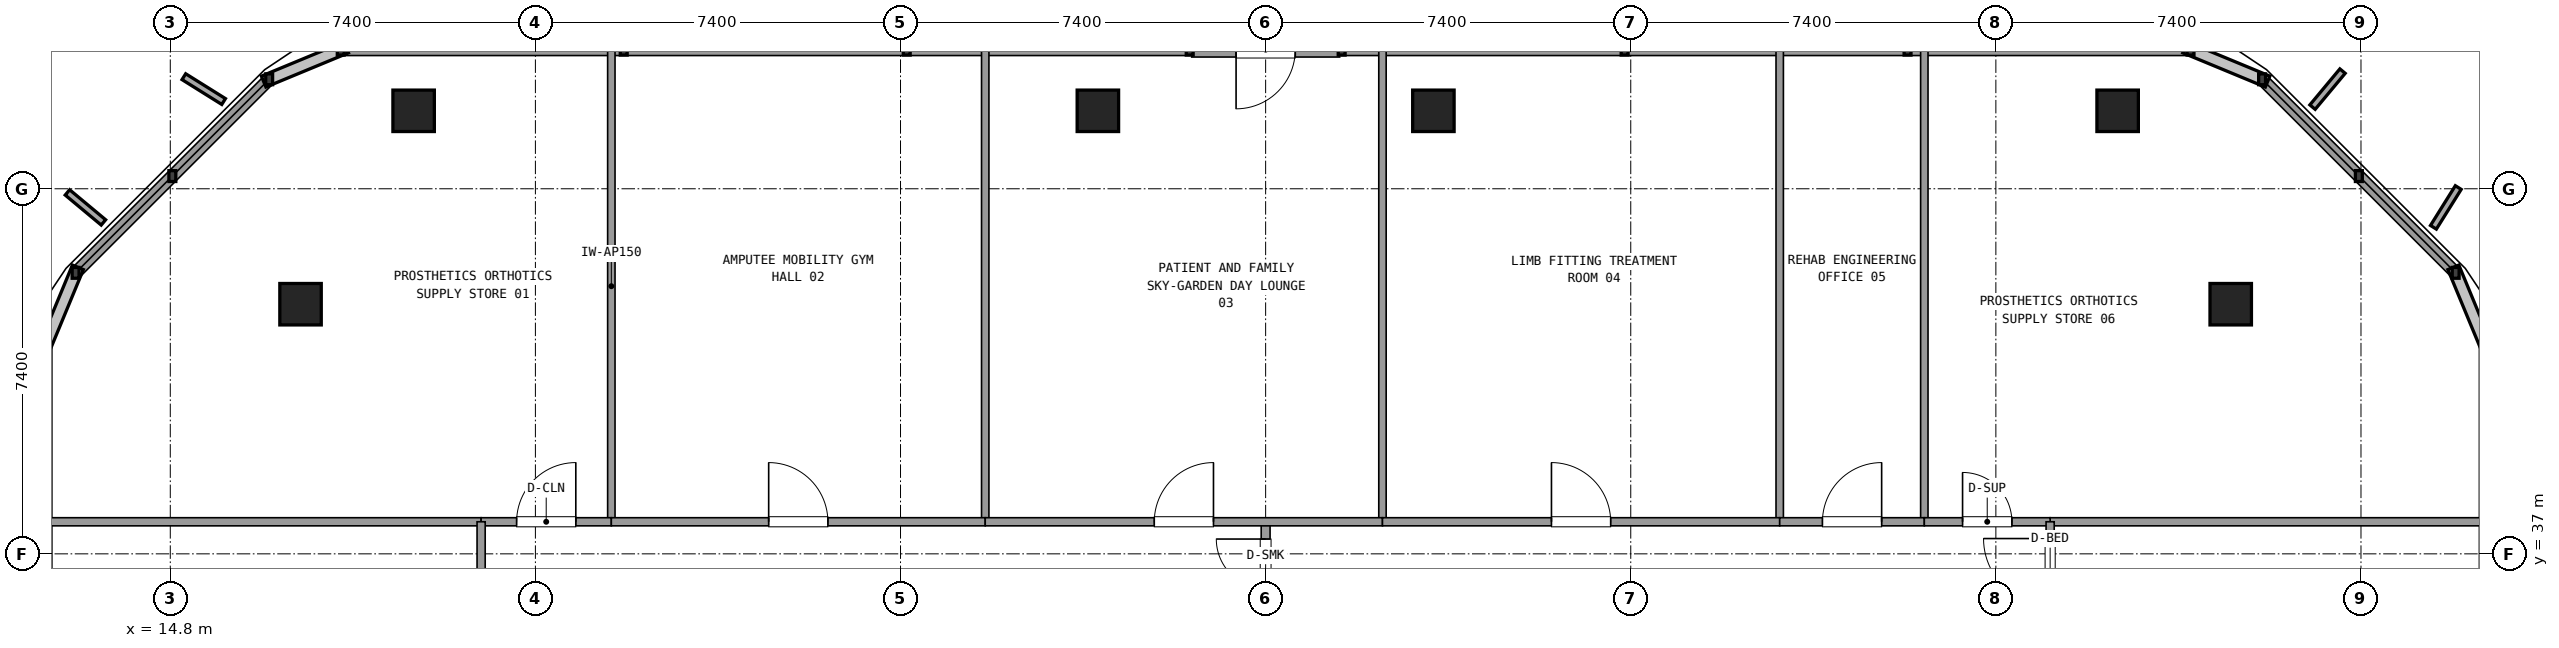
"""IFC4 building model, lengths in metres.
Left out: names, types, materials, properties, quantities, classifications, styles, units other than length and angle.
Written with IfcOpenShell. Run it as: python <this file> out.ifc"""

import sys

from ifc_helpers import new_model, si_unit, direction, frame, frame_2d, origin, origin_2d, place, context, subcontext, project, spatial, rectangle, extrude, element, fill, save


model = new_model("IFC4")
c1 = context("Model", 3, precision=1e-05, world=origin(), true_north=direction((0.0, 1.0)))
c2 = subcontext(c1, "Body", "Model", "MODEL_VIEW")
j1 = project(units=[si_unit("LENGTHUNIT", "METRE"), si_unit("PLANEANGLEUNIT", "RADIAN")], contexts=[c1])
p1 = place(None, origin())
s1 = spatial("IfcSite", under=j1, at=p1, CompositionType="ELEMENT")
p2 = place(p1, origin())
s2 = spatial("IfcBuilding", under=s1, at=p2, CompositionType="ELEMENT")
p3 = place(p2, frame((0.0, 0.0, 282.42)))
s3 = spatial("IfcBuildingStorey", under=s2, at=p3, CompositionType="ELEMENT", Elevation=282.42)
for number, where, z_axis, x_axis in (
    (1, (56.56, 42.06, 0.0), (0.0, 0.0, 1.0), (1.0, 0.0, 0.0)),
    (2, (54.268, 45.98, 0.0), (0.0, 0.0, 1.0), (1.0, 0.0, 0.0)),
    (3, (40.4, 45.98, 0.0), (0.0, 0.0, 1.0), (1.0, 0.0, 0.0)),
    (4, (33.6, 45.98, 0.0), (0.0, 0.0, 1.0), (1.0, 0.0, 0.0)),
    (5, (19.732, 45.98, 0.0), (0.0, 0.0, 1.0), (1.0, 0.0, 0.0)),
    (6, (17.44, 42.06, 0.0), (0.0, 0.0, 1.0), (1.0, 0.0, 0.0)),
):
    element("IfcColumn", number, at=place(p3, frame(where, z_axis=z_axis, x_axis=x_axis)), inside=s3, PredefinedType="COLUMN", context=c2, shape_type="SweptSolid", body=[
        extrude(rectangle(XDim=0.84, YDim=0.84, at=origin_2d()), origin(), (0.0, 0.0, 1.0), 3.6),
    ])
p4 = place(p3, frame((61.72, 10.555, 0.0), z_axis=(0.0, 0.0, 1.0), x_axis=(0.0, 1.0, 0.0)))
e7 = element("IfcWall", 7, at=p4, inside=s3, PredefinedType="SOLIDWALL", context=c2, shape_type="SweptSolid", body=[
    extrude(rectangle(XDim=30.69, YDim=0.24, at=frame_2d((15.345, 0.0))), origin(), (0.0, 0.0, 1.0), 0.85),
])
p5 = place(p3, frame((61.119, 42.696, 0.0), z_axis=(0.0, 0.0, 1.0), x_axis=(-0.707106781187, 0.707106781187, 0.0)))
e8 = element("IfcWall", 8, at=p5, inside=s3, PredefinedType="SOLIDWALL", context=c2, shape_type="SweptSolid", body=[
    extrude(rectangle(XDim=5.548, YDim=0.24, at=frame_2d((2.774, 0.0))), origin(), (0.0, 0.0, 1.0), 0.85),
])
p6 = place(p3, frame((38.501, 47.22, 0.0), z_axis=(0.0, 0.0, 1.0), x_axis=(-1.0, 0.0, 0.0)))
e9 = element("IfcWall", 9, at=p6, inside=s3, PredefinedType="SOLIDWALL", context=c2, shape_type="SweptSolid", body=[
    extrude(rectangle(XDim=3.0, YDim=0.3, at=frame_2d((1.5, 0.0))), origin(), (0.0, 0.0, 1.0), 2.35),
])
p7 = place(p6, frame((0.9, 0.0, 0.0)))
e10 = element("IfcOpeningElement", 10, at=p7, cuts=e9, PredefinedType="OPENING", context=c2, shape_type="SweptSolid", body=[
    extrude(rectangle(XDim=1.2, YDim=2.2, at=frame_2d((0.6, 1.1))), frame((0.0, 0.16, 0.0), z_axis=(0.0, -1.0, 0.0), x_axis=(1.0, 0.0, 0.0)), (0.0, 0.0, 1.0), 0.32),
])
p8 = place(p3, frame((55.745, 47.22, 0.0), z_axis=(0.0, 0.0, 1.0), x_axis=(-1.0, 0.0, 0.0)))
e11 = element("IfcWall", 11, at=p8, inside=s3, PredefinedType="SOLIDWALL", context=c2, shape_type="SweptSolid", body=[
    extrude(rectangle(XDim=17.204, YDim=0.24, at=frame_2d((8.602, 0.0))), origin(), (0.0, 0.0, 1.0), 0.85),
])
p9 = place(p3, frame((35.461, 47.22, 0.0), z_axis=(0.0, 0.0, 1.0), x_axis=(-1.0, 0.0, 0.0)))
e12 = element("IfcWall", 12, at=p9, inside=s3, PredefinedType="SOLIDWALL", context=c2, shape_type="SweptSolid", body=[
    extrude(rectangle(XDim=17.206, YDim=0.24, at=frame_2d((8.603, 0.0))), origin(), (0.0, 0.0, 1.0), 0.85),
])
p10 = place(p3, frame((16.804, 46.619, 0.0), z_axis=(0.0, 0.0, 1.0), x_axis=(-0.707106781187, -0.707106781187, 0.0)))
e13 = element("IfcWall", 13, at=p10, inside=s3, PredefinedType="SOLIDWALL", context=c2, shape_type="SweptSolid", body=[
    extrude(rectangle(XDim=5.548, YDim=0.24, at=frame_2d((2.774, 0.0))), origin(), (0.0, 0.0, 1.0), 0.85),
])
p11 = place(p3, frame((12.28, 41.245, 0.0), z_axis=(0.0, 0.0, 1.0), x_axis=(0.0, -1.0, 0.0)))
e14 = element("IfcWall", 14, at=p11, inside=s3, PredefinedType="SOLIDWALL", context=c2, shape_type="SweptSolid", body=[
    extrude(rectangle(XDim=30.69, YDim=0.24, at=frame_2d((15.345, 0.0))), origin(), (0.0, 0.0, 1.0), 0.85),
])
p12 = place(p3, frame((37.0, 34.95, 0.0), z_axis=(0.0, 0.0, 1.0), x_axis=(0.0, 1.0, 0.0)))
e15 = element("IfcWall", 15, at=p12, inside=s3, PredefinedType="PARTITIONING", context=c2, shape_type="SweptSolid", body=[
    extrude(rectangle(XDim=2.7, YDim=0.18, at=frame_2d((1.35, 0.0))), origin(), (0.0, 0.0, 1.0), 2.24),
])
p13 = place(p12, frame((0.35, 0.0, 0.0)))
e16 = element("IfcOpeningElement", 16, at=p13, cuts=e15, PredefinedType="OPENING", context=c2, shape_type="SweptSolid", body=[
    extrude(rectangle(XDim=2.0, YDim=2.2, at=frame_2d((1.0, 1.1))), frame((0.0, 0.1, 0.0), z_axis=(0.0, -1.0, 0.0), x_axis=(1.0, 0.0, 0.0)), (0.0, 0.0, 1.0), 0.2),
])
for number, where, z_axis, x_axis in (
    (17, (12.3, 37.65, 0.0), (0.0, 0.0, 1.0), (1.0, 0.0, 0.0)),
    (18, (52.9, 37.65, 0.0), (0.0, 0.0, 1.0), (1.0, 0.0, 0.0)),
):
    element("IfcWall", number, at=place(p3, frame(where, z_axis=z_axis, x_axis=x_axis)), inside=s3, PredefinedType="PARTITIONING", context=c2, shape_type="SweptSolid", body=[
        extrude(rectangle(XDim=8.8, YDim=0.165, at=frame_2d((4.4, 0.0))), origin(), (0.0, 0.0, 1.0), 2.24),
    ])
p14 = place(p3, frame((23.739, 37.65, 0.0), z_axis=(0.0, 0.0, 1.0), x_axis=(0.0, 1.0, 0.0)))
e19 = element("IfcWall", 19, at=p14, inside=s3, PredefinedType="PARTITIONING", context=c2, shape_type="SweptSolid", body=[
    extrude(rectangle(XDim=9.55, YDim=0.15, at=frame_2d((4.775, 0.0))), origin(), (0.0, 0.0, 1.0), 2.24),
])
p15 = place(p3, frame((21.1, 37.65, 0.0), z_axis=(0.0, 0.0, 1.0), x_axis=(1.0, 0.0, 0.0)))
e20 = element("IfcWall", 20, at=p15, inside=s3, PredefinedType="PARTITIONING", context=c2, shape_type="SweptSolid", body=[
    extrude(rectangle(XDim=2.639, YDim=0.165, at=frame_2d((1.319, 0.0))), origin(), (0.0, 0.0, 1.0), 2.24),
])
p16 = place(p15, frame((0.719, 0.0, 0.0)))
e21 = element("IfcOpeningElement", 21, at=p16, cuts=e20, PredefinedType="OPENING", context=c2, shape_type="SweptSolid", body=[
    extrude(rectangle(XDim=1.2, YDim=2.15, at=frame_2d((0.6, 1.075))), frame((0.0, 0.093, 0.0), z_axis=(0.0, -1.0, 0.0), x_axis=(1.0, 0.0, 0.0)), (0.0, 0.0, 1.0), 0.185),
])
p17 = place(p3, frame((31.317, 37.65, 0.0), z_axis=(0.0, 0.0, 1.0), x_axis=(0.0, 1.0, 0.0)))
e22 = element("IfcWall", 22, at=p17, inside=s3, PredefinedType="PARTITIONING", context=c2, shape_type="SweptSolid", body=[
    extrude(rectangle(XDim=9.55, YDim=0.15, at=frame_2d((4.775, 0.0))), origin(), (0.0, 0.0, 1.0), 2.24),
])
p18 = place(p3, frame((23.739, 37.65, 0.0), z_axis=(0.0, 0.0, 1.0), x_axis=(1.0, 0.0, 0.0)))
e23 = element("IfcWall", 23, at=p18, inside=s3, PredefinedType="PARTITIONING", context=c2, shape_type="SweptSolid", body=[
    extrude(rectangle(XDim=7.578, YDim=0.165, at=frame_2d((3.789, 0.0))), origin(), (0.0, 0.0, 1.0), 2.24),
])
p19 = place(p18, frame((3.189, 0.0, 0.0)))
e24 = element("IfcOpeningElement", 24, at=p19, cuts=e23, PredefinedType="OPENING", context=c2, shape_type="SweptSolid", body=[
    extrude(rectangle(XDim=1.2, YDim=2.15, at=frame_2d((0.6, 1.075))), frame((0.0, 0.093, 0.0), z_axis=(0.0, -1.0, 0.0), x_axis=(1.0, 0.0, 0.0)), (0.0, 0.0, 1.0), 0.185),
])
p20 = place(p3, frame((39.368, 37.65, 0.0), z_axis=(0.0, 0.0, 1.0), x_axis=(0.0, 1.0, 0.0)))
e25 = element("IfcWall", 25, at=p20, inside=s3, PredefinedType="PARTITIONING", context=c2, shape_type="SweptSolid", body=[
    extrude(rectangle(XDim=9.55, YDim=0.15, at=frame_2d((4.775, 0.0))), origin(), (0.0, 0.0, 1.0), 2.24),
])
p21 = place(p3, frame((31.317, 37.65, 0.0), z_axis=(0.0, 0.0, 1.0), x_axis=(1.0, 0.0, 0.0)))
e26 = element("IfcWall", 26, at=p21, inside=s3, PredefinedType="PARTITIONING", context=c2, shape_type="SweptSolid", body=[
    extrude(rectangle(XDim=8.051, YDim=0.165, at=frame_2d((4.025, 0.0))), origin(), (0.0, 0.0, 1.0), 2.24),
])
p22 = place(p21, frame((3.426, 0.0, 0.0)))
e27 = element("IfcOpeningElement", 27, at=p22, cuts=e26, PredefinedType="OPENING", context=c2, shape_type="SweptSolid", body=[
    extrude(rectangle(XDim=1.2, YDim=2.15, at=frame_2d((0.6, 1.075))), frame((0.0, 0.093, 0.0), z_axis=(0.0, -1.0, 0.0), x_axis=(1.0, 0.0, 0.0)), (0.0, 0.0, 1.0), 0.185),
])
p23 = place(p3, frame((47.419, 37.65, 0.0), z_axis=(0.0, 0.0, 1.0), x_axis=(0.0, 1.0, 0.0)))
e28 = element("IfcWall", 28, at=p23, inside=s3, PredefinedType="PARTITIONING", context=c2, shape_type="SweptSolid", body=[
    extrude(rectangle(XDim=9.55, YDim=0.15, at=frame_2d((4.775, 0.0))), origin(), (0.0, 0.0, 1.0), 2.24),
])
p24 = place(p3, frame((39.368, 37.65, 0.0), z_axis=(0.0, 0.0, 1.0), x_axis=(1.0, 0.0, 0.0)))
e29 = element("IfcWall", 29, at=p24, inside=s3, PredefinedType="PARTITIONING", context=c2, shape_type="SweptSolid", body=[
    extrude(rectangle(XDim=8.051, YDim=0.165, at=frame_2d((4.025, 0.0))), origin(), (0.0, 0.0, 1.0), 2.24),
])
p25 = place(p24, frame((3.425, 0.0, 0.0)))
e30 = element("IfcOpeningElement", 30, at=p25, cuts=e29, PredefinedType="OPENING", context=c2, shape_type="SweptSolid", body=[
    extrude(rectangle(XDim=1.2, YDim=2.15, at=frame_2d((0.6, 1.075))), frame((0.0, 0.093, 0.0), z_axis=(0.0, -1.0, 0.0), x_axis=(1.0, 0.0, 0.0)), (0.0, 0.0, 1.0), 0.185),
])
p26 = place(p3, frame((50.35, 37.65, 0.0), z_axis=(0.0, 0.0, 1.0), x_axis=(0.0, 1.0, 0.0)))
e31 = element("IfcWall", 31, at=p26, inside=s3, PredefinedType="PARTITIONING", context=c2, shape_type="SweptSolid", body=[
    extrude(rectangle(XDim=9.55, YDim=0.15, at=frame_2d((4.775, 0.0))), origin(), (0.0, 0.0, 1.0), 2.24),
])
p27 = place(p3, frame((47.419, 37.65, 0.0), z_axis=(0.0, 0.0, 1.0), x_axis=(1.0, 0.0, 0.0)))
e32 = element("IfcWall", 32, at=p27, inside=s3, PredefinedType="PARTITIONING", context=c2, shape_type="SweptSolid", body=[
    extrude(rectangle(XDim=2.931, YDim=0.165, at=frame_2d((1.466, 0.0))), origin(), (0.0, 0.0, 1.0), 2.24),
])
p28 = place(p27, frame((0.866, 0.0, 0.0)))
e33 = element("IfcOpeningElement", 33, at=p28, cuts=e32, PredefinedType="OPENING", context=c2, shape_type="SweptSolid", body=[
    extrude(rectangle(XDim=1.2, YDim=2.15, at=frame_2d((0.6, 1.075))), frame((0.0, 0.093, 0.0), z_axis=(0.0, -1.0, 0.0), x_axis=(1.0, 0.0, 0.0)), (0.0, 0.0, 1.0), 0.185),
])
p29 = place(p3, frame((50.35, 37.65, 0.0), z_axis=(0.0, 0.0, 1.0), x_axis=(1.0, 0.0, 0.0)))
e34 = element("IfcWall", 34, at=p29, inside=s3, PredefinedType="PARTITIONING", context=c2, shape_type="SweptSolid", body=[
    extrude(rectangle(XDim=2.55, YDim=0.165, at=frame_2d((1.275, 0.0))), origin(), (0.0, 0.0, 1.0), 2.24),
])
p30 = place(p29, frame((0.775, 0.0, 0.0)))
e35 = element("IfcOpeningElement", 35, at=p30, cuts=e34, PredefinedType="OPENING", context=c2, shape_type="SweptSolid", body=[
    extrude(rectangle(XDim=1.0, YDim=2.15, at=frame_2d((0.5, 1.075))), frame((0.0, 0.093, 0.0), z_axis=(0.0, -1.0, 0.0), x_axis=(1.0, 0.0, 0.0)), (0.0, 0.0, 1.0), 0.185),
])
p31 = place(p3, frame((21.1, 28.485, 0.0), z_axis=(0.0, 0.0, 1.0), x_axis=(0.0, 1.0, 0.0)))
e36 = element("IfcWall", 36, at=p31, inside=s3, PredefinedType="PARTITIONING", context=c2, shape_type="SweptSolid", body=[
    extrude(rectangle(XDim=9.165, YDim=0.165, at=frame_2d((4.583, 0.0))), origin(), (0.0, 0.0, 1.0), 2.24),
])
p32 = place(p31, frame((3.982, 0.0, 0.0)))
e37 = element("IfcOpeningElement", 37, at=p32, cuts=e36, PredefinedType="OPENING", context=c2, shape_type="SweptSolid", body=[
    extrude(rectangle(XDim=1.2, YDim=2.15, at=frame_2d((0.6, 1.075))), frame((0.0, 0.093, 0.0), z_axis=(0.0, -1.0, 0.0), x_axis=(1.0, 0.0, 0.0)), (0.0, 0.0, 1.0), 0.185),
])
p33 = place(p3, frame((52.9, 33.185, 0.0), z_axis=(0.0, 0.0, 1.0), x_axis=(0.0, 1.0, 0.0)))
e38 = element("IfcWall", 38, at=p33, inside=s3, PredefinedType="PARTITIONING", context=c2, shape_type="SweptSolid", body=[
    extrude(rectangle(XDim=4.465, YDim=0.165, at=frame_2d((2.232, 0.0))), origin(), (0.0, 0.0, 1.0), 2.24),
])
p34 = place(p33, frame((2.775, 0.0, 0.0)))
e39 = element("IfcOpeningElement", 39, at=p34, cuts=e38, PredefinedType="OPENING", context=c2, shape_type="SweptSolid", body=[
    extrude(rectangle(XDim=1.35, YDim=2.15, at=frame_2d((0.675, 1.075))), frame((0.0, 0.093, 0.0), z_axis=(0.0, -1.0, 0.0), x_axis=(1.0, 0.0, 0.0)), (0.0, 0.0, 1.0), 0.185),
])
p35 = place(p13, origin())
e40 = element("IfcDoor", 40, at=p35, inside=s3, OperationType="DOUBLE_DOOR_SINGLE_SWING", PredefinedType="DOOR", context=c2, shape_type="SweptSolid", body=[
    extrude(rectangle(XDim=2.0, YDim=2.2, at=frame_2d((1.0, 1.1))), frame((0.0, 0.025, 0.0), z_axis=(0.0, -1.0, 0.0), x_axis=(1.0, 0.0, 0.0)), (0.0, 0.0, 1.0), 0.05),
])
fill(e16, e40)
p36 = place(p16, origin())
e41 = element("IfcDoor", 41, at=p36, inside=s3, OperationType="SINGLE_SWING_RIGHT", PredefinedType="DOOR", context=c2, shape_type="SweptSolid", body=[
    extrude(rectangle(XDim=1.2, YDim=2.15, at=frame_2d((0.6, 1.075))), frame((0.0, 0.025, 0.0), z_axis=(0.0, -1.0, 0.0), x_axis=(1.0, 0.0, 0.0)), (0.0, 0.0, 1.0), 0.05),
])
fill(e21, e41)
p37 = place(p19, origin())
e42 = element("IfcDoor", 42, at=p37, inside=s3, OperationType="SINGLE_SWING_LEFT", PredefinedType="DOOR", context=c2, shape_type="SweptSolid", body=[
    extrude(rectangle(XDim=1.2, YDim=2.15, at=frame_2d((0.6, 1.075))), frame((0.0, 0.025, 0.0), z_axis=(0.0, -1.0, 0.0), x_axis=(1.0, 0.0, 0.0)), (0.0, 0.0, 1.0), 0.05),
])
fill(e24, e42)
p38 = place(p22, origin())
e43 = element("IfcDoor", 43, at=p38, inside=s3, OperationType="SINGLE_SWING_RIGHT", PredefinedType="DOOR", context=c2, shape_type="SweptSolid", body=[
    extrude(rectangle(XDim=1.2, YDim=2.15, at=frame_2d((0.6, 1.075))), frame((0.0, 0.025, 0.0), z_axis=(0.0, -1.0, 0.0), x_axis=(1.0, 0.0, 0.0)), (0.0, 0.0, 1.0), 0.05),
])
fill(e27, e43)
p39 = place(p25, origin())
e44 = element("IfcDoor", 44, at=p39, inside=s3, OperationType="SINGLE_SWING_LEFT", PredefinedType="DOOR", context=c2, shape_type="SweptSolid", body=[
    extrude(rectangle(XDim=1.2, YDim=2.15, at=frame_2d((0.6, 1.075))), frame((0.0, 0.025, 0.0), z_axis=(0.0, -1.0, 0.0), x_axis=(1.0, 0.0, 0.0)), (0.0, 0.0, 1.0), 0.05),
])
fill(e30, e44)
p40 = place(p28, origin())
e45 = element("IfcDoor", 45, at=p40, inside=s3, OperationType="SINGLE_SWING_RIGHT", PredefinedType="DOOR", context=c2, shape_type="SweptSolid", body=[
    extrude(rectangle(XDim=1.2, YDim=2.15, at=frame_2d((0.6, 1.075))), frame((0.0, 0.025, 0.0), z_axis=(0.0, -1.0, 0.0), x_axis=(1.0, 0.0, 0.0)), (0.0, 0.0, 1.0), 0.05),
])
fill(e33, e45)
p41 = place(p30, origin())
e46 = element("IfcDoor", 46, at=p41, inside=s3, OperationType="SINGLE_SWING_LEFT", PredefinedType="DOOR", context=c2, shape_type="SweptSolid", body=[
    extrude(rectangle(XDim=1.0, YDim=2.15, at=frame_2d((0.5, 1.075))), frame((0.0, 0.025, 0.0), z_axis=(0.0, -1.0, 0.0), x_axis=(1.0, 0.0, 0.0)), (0.0, 0.0, 1.0), 0.05),
])
fill(e35, e46)
p42 = place(p34, origin())
e47 = element("IfcDoor", 47, at=p42, inside=s3, OperationType="SINGLE_SWING_RIGHT", PredefinedType="DOOR", context=c2, shape_type="SweptSolid", body=[
    extrude(rectangle(XDim=1.35, YDim=2.15, at=frame_2d((0.675, 1.075))), frame((0.0, 0.025, 0.0), z_axis=(0.0, -1.0, 0.0), x_axis=(1.0, 0.0, 0.0)), (0.0, 0.0, 1.0), 0.05),
])
fill(e39, e47)
save(model, sys.argv[1])
